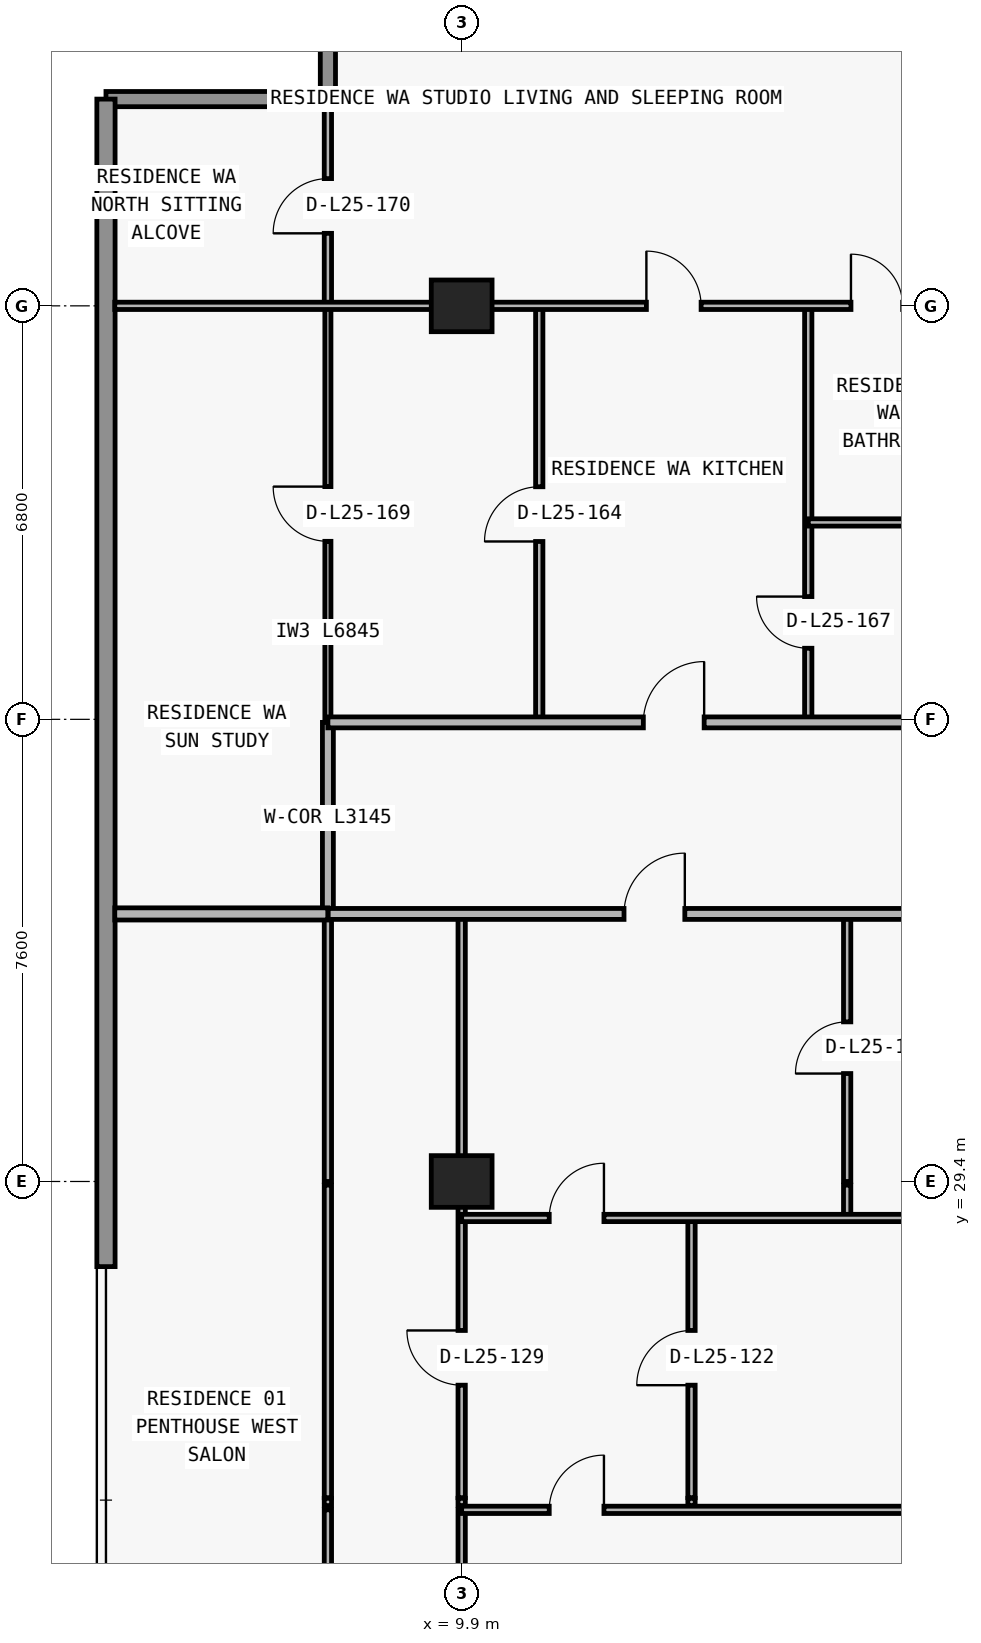
"""IFC4 building model, lengths in metres.
Left out: names, types, materials, properties, quantities, classifications, styles, units other than length and angle.
Written with IfcOpenShell. Run it as: python <this file> out.ifc"""

import sys

from ifc_helpers import new_model, si_unit, direction, frame, frame_2d, origin, origin_2d, place, context, subcontext, project, spatial, rectangle, extrude, element, fill, save


model = new_model("IFC4")
c1 = context("Model", 3, precision=1e-05, world=origin(), true_north=direction((0.0, 1.0)))
c2 = subcontext(c1, "Body", "Model", "MODEL_VIEW")
j1 = project(units=[si_unit("LENGTHUNIT", "METRE"), si_unit("PLANEANGLEUNIT", "RADIAN")], contexts=[c1])
p1 = place(None, origin())
s1 = spatial("IfcSite", under=j1, at=p1, CompositionType="ELEMENT")
p2 = place(p1, origin())
s2 = spatial("IfcBuilding", under=s1, at=p2, CompositionType="ELEMENT")
p3 = place(p2, frame((0.0, 0.0, 94.5)))
s3 = spatial("IfcBuildingStorey", under=s2, at=p3, CompositionType="ELEMENT", Elevation=94.5)
for number, where, z_axis, x_axis in (
    (1, (9.9, 29.4, 0.0), (0.0, 0.0, 1.0), (1.0, 0.0, 0.0)),
    (2, (9.9, 43.8, 0.0), (0.0, 0.0, 1.0), (1.0, 0.0, 0.0)),
):
    element("IfcColumn", number, at=place(p3, frame(where, z_axis=z_axis, x_axis=x_axis)), inside=s3, PredefinedType="COLUMN", context=c2, shape_type="SweptSolid", body=[
        extrude(rectangle(XDim=1.0, YDim=0.85, at=origin_2d()), origin(), (0.0, 0.0, 1.0), 3.0),
    ])
p4 = place(p3, frame((4.05, 47.2, 0.0), z_axis=(0.0, 0.0, 1.0), x_axis=(1.0, 0.0, 0.0)))
e3 = element("IfcWall", 3, at=p4, inside=s3, PredefinedType="ELEMENTEDWALL", context=c2, shape_type="SweptSolid", body=[
    extrude(rectangle(XDim=3.65, YDim=0.25, at=frame_2d((1.825, 0.0))), origin(), (0.0, 0.0, 1.0), 3.0),
])
p5 = place(p3, frame((7.7, 47.2, 0.0), z_axis=(0.0, 0.0, 1.0), x_axis=(0.0, 1.0, 0.0)))
e4 = element("IfcWall", 4, at=p5, inside=s3, PredefinedType="ELEMENTEDWALL", context=c2, shape_type="SweptSolid", body=[
    extrude(rectangle(XDim=3.25, YDim=0.25, at=frame_2d((1.625, 0.0))), origin(), (0.0, 0.0, 1.0), 3.0),
])
p6 = place(p3, frame((4.05, 28.0, 0.0), z_axis=(0.0, 0.0, 1.0), x_axis=(0.0, 1.0, 0.0)))
e5 = element("IfcWall", 5, at=p6, inside=s3, PredefinedType="STANDARD", context=c2, shape_type="SweptSolid", body=[
    extrude(rectangle(XDim=19.2, YDim=0.3, at=frame_2d((9.6, 0.0))), origin(), (0.0, 0.0, 1.0), 3.0),
])
p7 = place(p3, frame((7.7, 8.885, 0.0), z_axis=(0.0, 0.0, 1.0), x_axis=(0.0, 1.0, 0.0)))
e6 = element("IfcWall", 6, at=p7, inside=s3, PredefinedType="PARTITIONING", context=c2, shape_type="SweptSolid", body=[
    extrude(rectangle(XDim=15.115, YDim=0.12, at=frame_2d((7.558, 0.0))), origin(), (0.0, 0.0, 1.0), 3.0),
])
p8 = place(p7, frame((7.107, 0.0, 0.0)))
e7 = element("IfcOpeningElement", 7, at=p8, cuts=e6, PredefinedType="OPENING", context=c2, shape_type="SweptSolid", body=[
    extrude(rectangle(XDim=0.9, YDim=2.15, at=frame_2d((0.45, 1.075))), frame((0.0, 0.07, 0.0), z_axis=(0.0, -1.0, 0.0), x_axis=(1.0, 0.0, 0.0)), (0.0, 0.0, 1.0), 0.14),
])
p9 = place(p3, frame((7.7, 24.07, 0.0), z_axis=(0.0, 0.0, 1.0), x_axis=(0.0, 1.0, 0.0)))
e8 = element("IfcWall", 8, at=p9, inside=s3, PredefinedType="PARTITIONING", context=c2, shape_type="SweptSolid", body=[
    extrude(rectangle(XDim=0.12, YDim=0.12, at=frame_2d((0.06, 0.0))), origin(), (0.0, 0.0, 1.0), 3.0),
])
p10 = place(p3, frame((7.7, 24.2, 0.0), z_axis=(0.0, 0.0, 1.0), x_axis=(0.0, 1.0, 0.0)))
e9 = element("IfcWall", 9, at=p10, inside=s3, PredefinedType="PARTITIONING", context=c2, shape_type="SweptSolid", body=[
    extrude(rectangle(XDim=5.14, YDim=0.12, at=frame_2d((2.57, 0.0))), origin(), (0.0, 0.0, 1.0), 3.0),
])
p11 = place(p3, frame((7.7, 29.4, 0.0), z_axis=(0.0, 0.0, 1.0), x_axis=(0.0, 1.0, 0.0)))
e10 = element("IfcWall", 10, at=p11, inside=s3, PredefinedType="PARTITIONING", context=c2, shape_type="SweptSolid", body=[
    extrude(rectangle(XDim=4.4, YDim=0.12, at=frame_2d((2.2, 0.0))), origin(), (0.0, 0.0, 1.0), 3.0),
])
p12 = place(p3, frame((7.7, 33.805, 0.0), z_axis=(0.0, 0.0, 1.0), x_axis=(0.0, 1.0, 0.0)))
e11 = element("IfcWall", 11, at=p12, inside=s3, PredefinedType="PARTITIONING", context=c2, shape_type="SweptSolid", body=[
    extrude(rectangle(XDim=3.145, YDim=0.18, at=frame_2d((1.573, 0.0))), origin(), (0.0, 0.0, 1.0), 3.0),
])
p13 = place(p3, frame((7.7, 36.955, 0.0), z_axis=(0.0, 0.0, 1.0), x_axis=(0.0, 1.0, 0.0)))
e12 = element("IfcWall", 12, at=p13, inside=s3, PredefinedType="MOVABLE", context=c2, shape_type="SweptSolid", body=[
    extrude(rectangle(XDim=6.845, YDim=0.1, at=frame_2d((3.422, 0.0))), origin(), (0.0, 0.0, 1.0), 3.0),
])
p14 = place(p13, frame((2.972, 0.0, 0.0)))
e13 = element("IfcOpeningElement", 13, at=p14, cuts=e12, PredefinedType="OPENING", context=c2, shape_type="SweptSolid", body=[
    extrude(rectangle(XDim=0.9, YDim=2.15, at=frame_2d((0.45, 1.075))), frame((0.0, 0.06, 0.0), z_axis=(0.0, -1.0, 0.0), x_axis=(1.0, 0.0, 0.0)), (0.0, 0.0, 1.0), 0.12),
])
p15 = place(p3, frame((7.7, 43.805, 0.0), z_axis=(0.0, 0.0, 1.0), x_axis=(0.0, 1.0, 0.0)))
e14 = element("IfcWall", 14, at=p15, inside=s3, PredefinedType="PARTITIONING", context=c2, shape_type="SweptSolid", body=[
    extrude(rectangle(XDim=3.275, YDim=0.12, at=frame_2d((1.638, 0.0))), origin(), (0.0, 0.0, 1.0), 3.0),
])
p16 = place(p15, frame((1.188, 0.0, 0.0)))
e15 = element("IfcOpeningElement", 15, at=p16, cuts=e14, PredefinedType="OPENING", context=c2, shape_type="SweptSolid", body=[
    extrude(rectangle(XDim=0.9, YDim=2.15, at=frame_2d((0.45, 1.075))), frame((0.0, 0.07, 0.0), z_axis=(0.0, -1.0, 0.0), x_axis=(1.0, 0.0, 0.0)), (0.0, 0.0, 1.0), 0.14),
])
p17 = place(p3, frame((9.9, 8.84, 0.0), z_axis=(0.0, 0.0, 1.0), x_axis=(0.0, 1.0, 0.0)))
e16 = element("IfcWall", 16, at=p17, inside=s3, PredefinedType="PARTITIONING", context=c2, shape_type="SweptSolid", body=[
    extrude(rectangle(XDim=15.16, YDim=0.12, at=frame_2d((7.58, 0.0))), origin(), (0.0, 0.0, 1.0), 2.124),
])
p18 = place(p3, frame((9.9, 24.07, 0.0), z_axis=(0.0, 0.0, 1.0), x_axis=(0.0, 1.0, 0.0)))
e17 = element("IfcWall", 17, at=p18, inside=s3, PredefinedType="PARTITIONING", context=c2, shape_type="SweptSolid", body=[
    extrude(rectangle(XDim=0.12, YDim=0.12, at=frame_2d((0.06, 0.0))), origin(), (0.0, 0.0, 1.0), 2.124),
])
p19 = place(p3, frame((9.9, 24.2, 0.0), z_axis=(0.0, 0.0, 1.0), x_axis=(0.0, 1.0, 0.0)))
e18 = element("IfcWall", 18, at=p19, inside=s3, PredefinedType="PARTITIONING", context=c2, shape_type="SweptSolid", body=[
    extrude(rectangle(XDim=5.14, YDim=0.12, at=frame_2d((2.57, 0.0))), origin(), (0.0, 0.0, 1.0), 2.124),
])
p20 = place(p19, frame((1.85, 0.0, 0.0)))
e19 = element("IfcOpeningElement", 19, at=p20, cuts=e18, PredefinedType="OPENING", context=c2, shape_type="SweptSolid", body=[
    extrude(rectangle(XDim=0.9, YDim=2.074, at=frame_2d((0.45, 1.037))), frame((0.0, 0.07, 0.0), z_axis=(0.0, -1.0, 0.0), x_axis=(1.0, 0.0, 0.0)), (0.0, 0.0, 1.0), 0.14),
])
p21 = place(p3, frame((9.9, 29.4, 0.0), z_axis=(0.0, 0.0, 1.0), x_axis=(0.0, 1.0, 0.0)))
e20 = element("IfcWall", 20, at=p21, inside=s3, PredefinedType="PARTITIONING", context=c2, shape_type="SweptSolid", body=[
    extrude(rectangle(XDim=4.4, YDim=0.12, at=frame_2d((2.2, 0.0))), origin(), (0.0, 0.0, 1.0), 2.124),
])
p22 = place(p3, frame((11.176, 36.95, 0.0), z_axis=(0.0, 0.0, 1.0), x_axis=(0.0, 1.0, 0.0)))
e21 = element("IfcWall", 21, at=p22, inside=s3, PredefinedType="PARTITIONING", context=c2, shape_type="SweptSolid", body=[
    extrude(rectangle(XDim=6.85, YDim=0.12, at=frame_2d((3.425, 0.0))), origin(), (0.0, 0.0, 1.0), 3.0),
])
p23 = place(p22, frame((2.975, 0.0, 0.0)))
e22 = element("IfcOpeningElement", 22, at=p23, cuts=e21, PredefinedType="OPENING", context=c2, shape_type="SweptSolid", body=[
    extrude(rectangle(XDim=0.9, YDim=2.15, at=frame_2d((0.45, 1.075))), frame((0.0, 0.07, 0.0), z_axis=(0.0, -1.0, 0.0), x_axis=(1.0, 0.0, 0.0)), (0.0, 0.0, 1.0), 0.14),
])
p24 = place(p3, frame((13.68, 24.07, 0.0), z_axis=(0.0, 0.0, 1.0), x_axis=(0.0, 1.0, 0.0)))
e23 = element("IfcWall", 23, at=p24, inside=s3, PredefinedType="PARTITIONING", context=c2, shape_type="SweptSolid", body=[
    extrude(rectangle(XDim=0.12, YDim=0.12, at=frame_2d((0.06, 0.0))), origin(), (0.0, 0.0, 1.0), 3.0),
])
p25 = place(p3, frame((13.68, 24.2, 0.0), z_axis=(0.0, 0.0, 1.0), x_axis=(0.0, 1.0, 0.0)))
e24 = element("IfcWall", 24, at=p25, inside=s3, PredefinedType="PARTITIONING", context=c2, shape_type="SweptSolid", body=[
    extrude(rectangle(XDim=4.6, YDim=0.12, at=frame_2d((2.3, 0.0))), origin(), (0.0, 0.0, 1.0), 3.0),
])
p26 = place(p25, frame((1.85, 0.0, 0.0)))
e25 = element("IfcOpeningElement", 25, at=p26, cuts=e24, PredefinedType="OPENING", context=c2, shape_type="SweptSolid", body=[
    extrude(rectangle(XDim=0.9, YDim=2.15, at=frame_2d((0.45, 1.075))), frame((0.0, 0.07, 0.0), z_axis=(0.0, -1.0, 0.0), x_axis=(1.0, 0.0, 0.0)), (0.0, 0.0, 1.0), 0.14),
])
p27 = place(p3, frame((15.6, 36.95, 0.0), z_axis=(0.0, 0.0, 1.0), x_axis=(0.0, 1.0, 0.0)))
e26 = element("IfcWall", 26, at=p27, inside=s3, PredefinedType="PARTITIONING", context=c2, shape_type="SweptSolid", body=[
    extrude(rectangle(XDim=6.85, YDim=0.12, at=frame_2d((3.425, 0.0))), origin(), (0.0, 0.0, 1.0), 3.0),
])
p28 = place(p27, frame((1.219, 0.0, 0.0)))
e27 = element("IfcOpeningElement", 27, at=p28, cuts=e26, PredefinedType="OPENING", context=c2, shape_type="SweptSolid", body=[
    extrude(rectangle(XDim=0.85, YDim=2.1, at=frame_2d((0.425, 1.05))), frame((0.0, 0.07, 0.0), z_axis=(0.0, -1.0, 0.0), x_axis=(1.0, 0.0, 0.0)), (0.0, 0.0, 1.0), 0.14),
])
p29 = place(p3, frame((16.24, 28.8, 0.0), z_axis=(0.0, 0.0, 1.0), x_axis=(0.0, 1.0, 0.0)))
e28 = element("IfcWall", 28, at=p29, inside=s3, PredefinedType="PARTITIONING", context=c2, shape_type="SweptSolid", body=[
    extrude(rectangle(XDim=0.54, YDim=0.12, at=frame_2d((0.27, 0.0))), origin(), (0.0, 0.0, 1.0), 2.629),
])
p30 = place(p3, frame((16.24, 29.4, 0.0), z_axis=(0.0, 0.0, 1.0), x_axis=(0.0, 1.0, 0.0)))
e29 = element("IfcWall", 29, at=p30, inside=s3, PredefinedType="PARTITIONING", context=c2, shape_type="SweptSolid", body=[
    extrude(rectangle(XDim=4.4, YDim=0.12, at=frame_2d((2.2, 0.0))), origin(), (0.0, 0.0, 1.0), 2.629),
])
p31 = place(p30, frame((1.775, 0.0, 0.0)))
e30 = element("IfcOpeningElement", 30, at=p31, cuts=e29, PredefinedType="OPENING", context=c2, shape_type="SweptSolid", body=[
    extrude(rectangle(XDim=0.85, YDim=2.1, at=frame_2d((0.425, 1.05))), frame((0.0, 0.07, 0.0), z_axis=(0.0, -1.0, 0.0), x_axis=(1.0, 0.0, 0.0)), (0.0, 0.0, 1.0), 0.14),
])
p32 = place(p3, frame((9.9, 24.0, 0.0), z_axis=(0.0, 0.0, 1.0), x_axis=(1.0, 0.0, 0.0)))
e31 = element("IfcWall", 31, at=p32, inside=s3, PredefinedType="PARTITIONING", context=c2, shape_type="SweptSolid", body=[
    extrude(rectangle(XDim=8.35, YDim=0.12, at=frame_2d((4.175, 0.0))), origin(), (0.0, 0.0, 1.0), 3.0),
])
p33 = place(p32, frame((1.44, 0.0, 0.0)))
e32 = element("IfcOpeningElement", 32, at=p33, cuts=e31, PredefinedType="OPENING", context=c2, shape_type="SweptSolid", body=[
    extrude(rectangle(XDim=0.9, YDim=2.15, at=frame_2d((0.45, 1.075))), frame((0.0, 0.07, 0.0), z_axis=(0.0, -1.0, 0.0), x_axis=(1.0, 0.0, 0.0)), (0.0, 0.0, 1.0), 0.14),
])
p34 = place(p3, frame((9.9, 28.8, 0.0), z_axis=(0.0, 0.0, 1.0), x_axis=(1.0, 0.0, 0.0)))
e33 = element("IfcWall", 33, at=p34, inside=s3, PredefinedType="PARTITIONING", context=c2, shape_type="SweptSolid", body=[
    extrude(rectangle(XDim=8.35, YDim=0.12, at=frame_2d((4.175, 0.0))), origin(), (0.0, 0.0, 1.0), 3.0),
])
p35 = place(p34, frame((1.44, 0.0, 0.0)))
e34 = element("IfcOpeningElement", 34, at=p35, cuts=e33, PredefinedType="OPENING", context=c2, shape_type="SweptSolid", body=[
    extrude(rectangle(XDim=0.9, YDim=2.15, at=frame_2d((0.45, 1.075))), frame((0.0, 0.07, 0.0), z_axis=(0.0, -1.0, 0.0), x_axis=(1.0, 0.0, 0.0)), (0.0, 0.0, 1.0), 0.14),
])
p36 = place(p3, frame((4.195, 33.8, 0.0), z_axis=(0.0, 0.0, 1.0), x_axis=(1.0, 0.0, 0.0)))
e35 = element("IfcWall", 35, at=p36, inside=s3, PredefinedType="PARTITIONING", context=c2, shape_type="SweptSolid", body=[
    extrude(rectangle(XDim=3.505, YDim=0.2, at=frame_2d((1.752, 0.0))), origin(), (0.0, 0.0, 1.0), 3.0),
])
p37 = place(p3, frame((7.705, 33.8, 0.0), z_axis=(0.0, 0.0, 1.0), x_axis=(1.0, 0.0, 0.0)))
e36 = element("IfcWall", 36, at=p37, inside=s3, PredefinedType="PARTITIONING", context=c2, shape_type="SweptSolid", body=[
    extrude(rectangle(XDim=10.545, YDim=0.18, at=frame_2d((5.272, 0.0))), origin(), (0.0, 0.0, 1.0), 3.0),
])
p38 = place(p37, frame((4.865, 0.0, 0.0)))
e37 = element("IfcOpeningElement", 37, at=p38, cuts=e36, PredefinedType="OPENING", context=c2, shape_type="SweptSolid", body=[
    extrude(rectangle(XDim=1.0, YDim=2.2, at=frame_2d((0.5, 1.1))), frame((0.0, 0.1, 0.0), z_axis=(0.0, -1.0, 0.0), x_axis=(1.0, 0.0, 0.0)), (0.0, 0.0, 1.0), 0.2),
])
p39 = place(p3, frame((7.7, 36.95, 0.0), z_axis=(0.0, 0.0, 1.0), x_axis=(1.0, 0.0, 0.0)))
e38 = element("IfcWall", 38, at=p39, inside=s3, PredefinedType="PARTITIONING", context=c2, shape_type="SweptSolid", body=[
    extrude(rectangle(XDim=10.145, YDim=0.18, at=frame_2d((5.073, 0.0))), origin(), (0.0, 0.0, 1.0), 3.0),
])
p40 = place(p39, frame((5.188, 0.0, 0.0)))
e39 = element("IfcOpeningElement", 39, at=p40, cuts=e38, PredefinedType="OPENING", context=c2, shape_type="SweptSolid", body=[
    extrude(rectangle(XDim=1.0, YDim=2.2, at=frame_2d((0.5, 1.1))), frame((0.0, 0.1, 0.0), z_axis=(0.0, -1.0, 0.0), x_axis=(1.0, 0.0, 0.0)), (0.0, 0.0, 1.0), 0.2),
])
p41 = place(p3, frame((15.6, 40.238, 0.0), z_axis=(0.0, 0.0, 1.0), x_axis=(1.0, 0.0, 0.0)))
e40 = element("IfcWall", 40, at=p41, inside=s3, PredefinedType="PARTITIONING", context=c2, shape_type="SweptSolid", body=[
    extrude(rectangle(XDim=2.255, YDim=0.12, at=frame_2d((1.127, 0.0))), origin(), (0.0, 0.0, 1.0), 3.0),
])
p42 = place(p3, frame((4.195, 43.8, 0.0), z_axis=(0.0, 0.0, 1.0), x_axis=(1.0, 0.0, 0.0)))
e41 = element("IfcWall", 41, at=p42, inside=s3, PredefinedType="PARTITIONING", context=c2, shape_type="SweptSolid", body=[
    extrude(rectangle(XDim=13.66, YDim=0.12, at=frame_2d((6.83, 0.0))), origin(), (0.0, 0.0, 1.0), 2.289),
])
p43 = place(p42, frame((8.743, 0.0, 0.0)))
e42 = element("IfcOpeningElement", 42, at=p43, cuts=e41, PredefinedType="OPENING", context=c2, shape_type="SweptSolid", body=[
    extrude(rectangle(XDim=0.9, YDim=2.15, at=frame_2d((0.45, 1.075))), frame((0.0, 0.07, 0.0), z_axis=(0.0, -1.0, 0.0), x_axis=(1.0, 0.0, 0.0)), (0.0, 0.0, 1.0), 0.14),
])
p44 = place(p42, frame((12.107, 0.0, 0.0)))
e43 = element("IfcOpeningElement", 43, at=p44, cuts=e41, PredefinedType="OPENING", context=c2, shape_type="SweptSolid", body=[
    extrude(rectangle(XDim=0.85, YDim=2.1, at=frame_2d((0.425, 1.05))), frame((0.0, 0.07, 0.0), z_axis=(0.0, -1.0, 0.0), x_axis=(1.0, 0.0, 0.0)), (0.0, 0.0, 1.0), 0.14),
])
p45 = place(p38, origin())
e44 = element("IfcDoor", 44, at=p45, inside=s3, OperationType="SINGLE_SWING_RIGHT", PredefinedType="DOOR", context=c2, shape_type="SweptSolid", body=[
    extrude(rectangle(XDim=1.0, YDim=2.2, at=frame_2d((0.5, 1.1))), frame((0.0, 0.025, 0.0), z_axis=(0.0, -1.0, 0.0), x_axis=(1.0, 0.0, 0.0)), (0.0, 0.0, 1.0), 0.05),
])
fill(e37, e44)
p46 = place(p31, origin())
e45 = element("IfcDoor", 45, at=p46, inside=s3, OperationType="SINGLE_SWING_LEFT", PredefinedType="DOOR", context=c2, shape_type="SweptSolid", body=[
    extrude(rectangle(XDim=0.85, YDim=2.1, at=frame_2d((0.425, 1.05))), frame((0.0, 0.025, 0.0), z_axis=(0.0, -1.0, 0.0), x_axis=(1.0, 0.0, 0.0)), (0.0, 0.0, 1.0), 0.05),
])
fill(e30, e45)
p47 = place(p35, origin())
e46 = element("IfcDoor", 46, at=p47, inside=s3, OperationType="SINGLE_SWING_RIGHT", PredefinedType="DOOR", context=c2, shape_type="SweptSolid", body=[
    extrude(rectangle(XDim=0.9, YDim=2.15, at=frame_2d((0.45, 1.075))), frame((0.0, 0.025, 0.0), z_axis=(0.0, -1.0, 0.0), x_axis=(1.0, 0.0, 0.0)), (0.0, 0.0, 1.0), 0.05),
])
fill(e34, e46)
p48 = place(p26, origin())
e47 = element("IfcDoor", 47, at=p48, inside=s3, OperationType="SINGLE_SWING_LEFT", PredefinedType="DOOR", context=c2, shape_type="SweptSolid", body=[
    extrude(rectangle(XDim=0.9, YDim=2.15, at=frame_2d((0.45, 1.075))), frame((0.0, 0.025, 0.0), z_axis=(0.0, -1.0, 0.0), x_axis=(1.0, 0.0, 0.0)), (0.0, 0.0, 1.0), 0.05),
])
fill(e25, e47)
p49 = place(p33, origin())
e48 = element("IfcDoor", 48, at=p49, inside=s3, OperationType="SINGLE_SWING_RIGHT", PredefinedType="DOOR", context=c2, shape_type="SweptSolid", body=[
    extrude(rectangle(XDim=0.9, YDim=2.15, at=frame_2d((0.45, 1.075))), frame((0.0, 0.025, 0.0), z_axis=(0.0, -1.0, 0.0), x_axis=(1.0, 0.0, 0.0)), (0.0, 0.0, 1.0), 0.05),
])
fill(e32, e48)
p50 = place(p20, origin())
e49 = element("IfcDoor", 49, at=p50, inside=s3, OperationType="SINGLE_SWING_RIGHT", PredefinedType="DOOR", context=c2, shape_type="SweptSolid", body=[
    extrude(rectangle(XDim=0.9, YDim=2.074, at=frame_2d((0.45, 1.037))), frame((0.0, 0.025, 0.0), z_axis=(0.0, -1.0, 0.0), x_axis=(1.0, 0.0, 0.0)), (0.0, 0.0, 1.0), 0.05),
])
fill(e19, e49)
p51 = place(p23, origin())
e50 = element("IfcDoor", 50, at=p51, inside=s3, OperationType="SINGLE_SWING_LEFT", PredefinedType="DOOR", context=c2, shape_type="SweptSolid", body=[
    extrude(rectangle(XDim=0.9, YDim=2.15, at=frame_2d((0.45, 1.075))), frame((0.0, 0.025, 0.0), z_axis=(0.0, -1.0, 0.0), x_axis=(1.0, 0.0, 0.0)), (0.0, 0.0, 1.0), 0.05),
])
fill(e22, e50)
p52 = place(p40, origin())
e51 = element("IfcDoor", 51, at=p52, inside=s3, OperationType="SINGLE_SWING_RIGHT", PredefinedType="DOOR", context=c2, shape_type="SweptSolid", body=[
    extrude(rectangle(XDim=1.0, YDim=2.2, at=frame_2d((0.5, 1.1))), frame((0.0, 0.025, 0.0), z_axis=(0.0, -1.0, 0.0), x_axis=(1.0, 0.0, 0.0)), (0.0, 0.0, 1.0), 0.05),
])
fill(e39, e51)
p53 = place(p43, origin())
e52 = element("IfcDoor", 52, at=p53, inside=s3, OperationType="SINGLE_SWING_LEFT", PredefinedType="DOOR", context=c2, shape_type="SweptSolid", body=[
    extrude(rectangle(XDim=0.9, YDim=2.15, at=frame_2d((0.45, 1.075))), frame((0.0, 0.025, 0.0), z_axis=(0.0, -1.0, 0.0), x_axis=(1.0, 0.0, 0.0)), (0.0, 0.0, 1.0), 0.05),
])
fill(e42, e52)
p54 = place(p28, origin())
e53 = element("IfcDoor", 53, at=p54, inside=s3, OperationType="SINGLE_SWING_RIGHT", PredefinedType="DOOR", context=c2, shape_type="SweptSolid", body=[
    extrude(rectangle(XDim=0.85, YDim=2.1, at=frame_2d((0.425, 1.05))), frame((0.0, 0.025, 0.0), z_axis=(0.0, -1.0, 0.0), x_axis=(1.0, 0.0, 0.0)), (0.0, 0.0, 1.0), 0.05),
])
fill(e27, e53)
p55 = place(p44, origin())
e54 = element("IfcDoor", 54, at=p55, inside=s3, OperationType="SINGLE_SWING_LEFT", PredefinedType="DOOR", context=c2, shape_type="SweptSolid", body=[
    extrude(rectangle(XDim=0.85, YDim=2.1, at=frame_2d((0.425, 1.05))), frame((0.0, 0.025, 0.0), z_axis=(0.0, -1.0, 0.0), x_axis=(1.0, 0.0, 0.0)), (0.0, 0.0, 1.0), 0.05),
])
fill(e43, e54)
p56 = place(p14, origin())
e55 = element("IfcDoor", 55, at=p56, inside=s3, OperationType="SINGLE_SWING_RIGHT", PredefinedType="DOOR", context=c2, shape_type="SweptSolid", body=[
    extrude(rectangle(XDim=0.9, YDim=2.15, at=frame_2d((0.45, 1.075))), frame((0.0, 0.025, 0.0), z_axis=(0.0, -1.0, 0.0), x_axis=(1.0, 0.0, 0.0)), (0.0, 0.0, 1.0), 0.05),
])
fill(e13, e55)
p57 = place(p16, origin())
e56 = element("IfcDoor", 56, at=p57, inside=s3, OperationType="SINGLE_SWING_LEFT", PredefinedType="DOOR", context=c2, shape_type="SweptSolid", body=[
    extrude(rectangle(XDim=0.9, YDim=2.15, at=frame_2d((0.45, 1.075))), frame((0.0, 0.025, 0.0), z_axis=(0.0, -1.0, 0.0), x_axis=(1.0, 0.0, 0.0)), (0.0, 0.0, 1.0), 0.05),
])
fill(e15, e56)
save(model, sys.argv[1])
